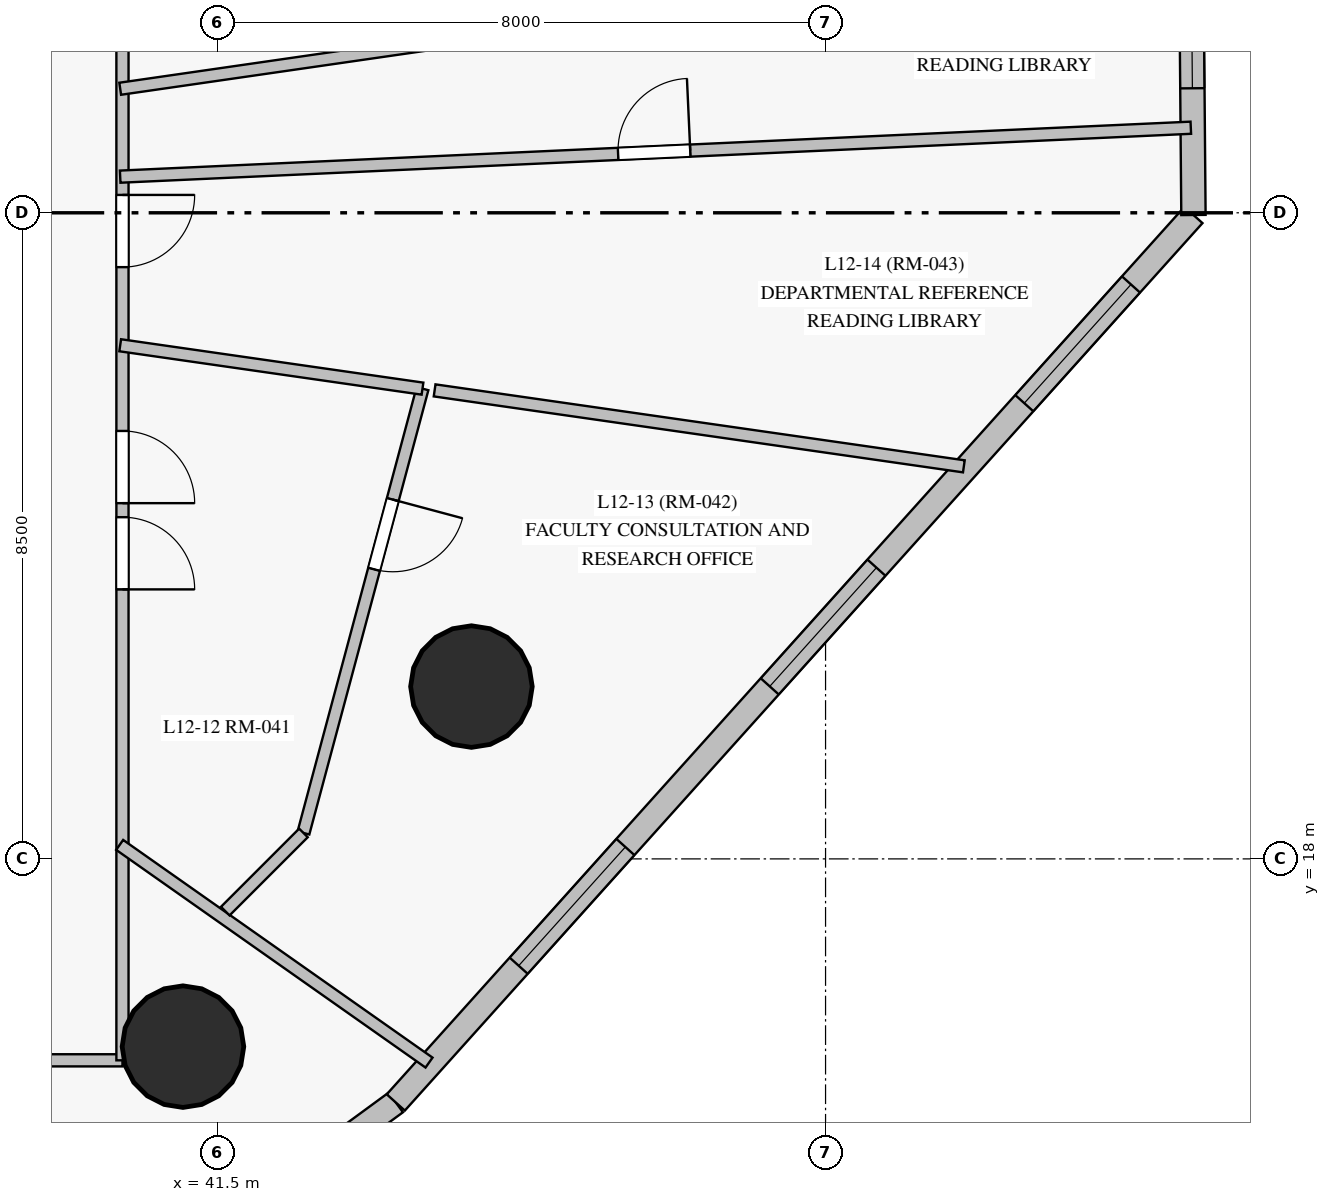
"""IFC4 building model, lengths in metres.
Left out: names, types, materials, properties, quantities, classifications, styles, units other than length and angle.
Written with IfcOpenShell. Run it as: python <this file> out.ifc"""

import sys

from ifc_helpers import new_model, si_unit, direction, frame, frame_2d, origin, origin_with_axes, origin_2d, place, context, subcontext, project, spatial, rectangle, circle, extrude, source, transform, mapped, element, fill, save


model = new_model("IFC4")
c1 = context("Model", 3, precision=1e-05, world=origin(), true_north=direction((0.0, 1.0)))
c2 = subcontext(c1, "Body", "Model", "MODEL_VIEW")
j1 = project(units=[si_unit("LENGTHUNIT", "METRE"), si_unit("PLANEANGLEUNIT", "RADIAN")], contexts=[c1])
p1 = place(None, origin())
s1 = spatial("IfcSite", under=j1, at=p1, CompositionType="ELEMENT")
p2 = place(p1, origin())
s2 = spatial("IfcBuilding", under=s1, at=p2, CompositionType="ELEMENT")
p3 = place(p2, frame((0.0, 0.0, 48.1)))
s3 = spatial("IfcBuildingStorey", under=s2, at=p3, CompositionType="ELEMENT", Elevation=48.1)
m1 = source(origin_with_axes(), c2, "Body", "SweptSolid", [
    extrude(circle(Radius=0.8, at=origin_2d()), origin(), (0.0, 0.0, 1.0), 3.6),
])
for number, where, z_axis, x_axis in (
    (1, (44.841, 20.267, 0.0), (0.0, 0.0, 1.0), (1.0, 0.0, 0.0)),
    (2, (41.046, 15.53, 0.0), (0.0, 0.0, 1.0), (1.0, 0.0, 0.0)),
):
    element("IfcColumn", number, at=place(p3, frame(where, z_axis=z_axis, x_axis=x_axis)), inside=s3, PredefinedType="COLUMN", context=c2, shape_type="MappedRepresentation", body=[
        mapped(m1, transform((0.0, 0.0, 0.0), scale=1.0)),
    ])
p4 = place(p3, frame((35.042, 8.343, 0.0), z_axis=(0.0, 0.0, 1.0), x_axis=(0.806545755589, 0.591171670618, 0.0)))
e3 = element("IfcWall", 3, at=p4, inside=s3, PredefinedType="SOLIDWALL", context=c2, shape_type="SweptSolid", body=[
    extrude(rectangle(XDim=10.916, YDim=0.32, at=frame_2d((5.458, 0.0))), origin(), (0.0, 0.0, 1.0), 3.35),
])
p5 = place(p4, frame((1.869, 0.0, 0.85)))
e4 = element("IfcOpeningElement", 4, at=p5, cuts=e3, PredefinedType="OPENING", context=c2, shape_type="SweptSolid", body=[
    extrude(rectangle(XDim=2.1, YDim=1.95, at=frame_2d((1.05, 0.975))), frame((0.0, 0.17, 0.0), z_axis=(0.0, -1.0, 0.0), x_axis=(1.0, 0.0, 0.0)), (0.0, 0.0, 1.0), 0.34),
])
p6 = place(p4, frame((6.947, 0.0, 0.85)))
e5 = element("IfcOpeningElement", 5, at=p6, cuts=e3, PredefinedType="OPENING", context=c2, shape_type="SweptSolid", body=[
    extrude(rectangle(XDim=2.1, YDim=1.95, at=frame_2d((1.05, 0.975))), frame((0.0, 0.17, 0.0), z_axis=(0.0, -1.0, 0.0), x_axis=(1.0, 0.0, 0.0)), (0.0, 0.0, 1.0), 0.34),
])
p7 = place(p3, frame((43.846, 14.796, 0.0), z_axis=(0.0, 0.0, 1.0), x_axis=(0.668485145509, 0.743725493871, 0.0)))
e6 = element("IfcWall", 6, at=p7, inside=s3, PredefinedType="SOLIDWALL", context=c2, shape_type="SweptSolid", body=[
    extrude(rectangle(XDim=15.698, YDim=0.32, at=frame_2d((7.849, 0.0))), origin(), (0.0, 0.0, 1.0), 3.35),
])
p8 = place(p7, frame((2.419, 0.0, 0.85)))
e7 = element("IfcOpeningElement", 7, at=p8, cuts=e6, PredefinedType="OPENING", context=c2, shape_type="SweptSolid", body=[
    extrude(rectangle(XDim=2.1, YDim=1.95, at=frame_2d((1.05, 0.975))), frame((0.0, 0.17, 0.0), z_axis=(0.0, -1.0, 0.0), x_axis=(1.0, 0.0, 0.0)), (0.0, 0.0, 1.0), 0.34),
])
p9 = place(p7, frame((7.36, 0.0, 0.85)))
e8 = element("IfcOpeningElement", 8, at=p9, cuts=e6, PredefinedType="OPENING", context=c2, shape_type="SweptSolid", body=[
    extrude(rectangle(XDim=2.1, YDim=1.95, at=frame_2d((1.05, 0.975))), frame((0.0, 0.17, 0.0), z_axis=(0.0, -1.0, 0.0), x_axis=(1.0, 0.0, 0.0)), (0.0, 0.0, 1.0), 0.34),
])
p10 = place(p7, frame((12.369, 0.0, 0.85)))
e9 = element("IfcOpeningElement", 9, at=p10, cuts=e6, PredefinedType="OPENING", context=c2, shape_type="SweptSolid", body=[
    extrude(rectangle(XDim=2.1, YDim=1.95, at=frame_2d((1.05, 0.975))), frame((0.0, 0.17, 0.0), z_axis=(0.0, -1.0, 0.0), x_axis=(1.0, 0.0, 0.0)), (0.0, 0.0, 1.0), 0.34),
])
p11 = place(p3, frame((54.34, 26.471, 0.0), z_axis=(0.0, 0.0, 1.0), x_axis=(-0.008424635088, 0.999964512132, 0.0)))
e10 = element("IfcWall", 10, at=p11, inside=s3, PredefinedType="SOLIDWALL", context=c2, shape_type="SweptSolid", body=[
    extrude(rectangle(XDim=10.462, YDim=0.32, at=frame_2d((5.231, 0.0))), origin(), (0.0, 0.0, 1.0), 3.35),
])
p12 = place(p11, frame((1.667, 0.0, 0.85)))
e11 = element("IfcOpeningElement", 11, at=p12, cuts=e10, PredefinedType="OPENING", context=c2, shape_type="SweptSolid", body=[
    extrude(rectangle(XDim=1.5, YDim=1.85, at=frame_2d((0.75, 0.925))), frame((0.0, 0.17, 0.0), z_axis=(0.0, -1.0, 0.0), x_axis=(1.0, 0.0, 0.0)), (0.0, 0.0, 1.0), 0.34),
])
p13 = place(p11, frame((4.245, 0.0, 0.85)))
e12 = element("IfcOpeningElement", 12, at=p13, cuts=e10, PredefinedType="OPENING", context=c2, shape_type="SweptSolid", body=[
    extrude(rectangle(XDim=1.8, YDim=1.85, at=frame_2d((0.9, 0.925))), frame((0.0, 0.17, 0.0), z_axis=(0.0, -1.0, 0.0), x_axis=(1.0, 0.0, 0.0)), (0.0, 0.0, 1.0), 0.34),
])
p14 = place(p11, frame((7.452, 0.0, 0.85)))
e13 = element("IfcOpeningElement", 13, at=p14, cuts=e10, PredefinedType="OPENING", context=c2, shape_type="SweptSolid", body=[
    extrude(rectangle(XDim=2.1, YDim=1.95, at=frame_2d((1.05, 0.975))), frame((0.0, 0.17, 0.0), z_axis=(0.0, -1.0, 0.0), x_axis=(1.0, 0.0, 0.0)), (0.0, 0.0, 1.0), 0.34),
])
p15 = place(p3, frame((40.25, 15.35, 0.0), z_axis=(0.0, 0.0, 1.0), x_axis=(-1.0, 0.0, 0.0)))
e14 = element("IfcWall", 14, at=p15, inside=s3, PredefinedType="PARTITIONING", context=c2, shape_type="SweptSolid", body=[
    extrude(rectangle(XDim=29.75, YDim=0.16, at=frame_2d((14.875, 0.0))), origin(), (0.0, 0.0, 1.0), 2.7),
])
p16 = place(p15, frame((26.423, 0.0, 0.0)))
e15 = element("IfcOpeningElement", 15, at=p16, cuts=e14, PredefinedType="OPENING", context=c2, shape_type="SweptSolid", body=[
    extrude(rectangle(XDim=0.95, YDim=2.15, at=frame_2d((0.475, 1.075))), frame((0.0, 0.09, 0.0), z_axis=(0.0, -1.0, 0.0), x_axis=(1.0, 0.0, 0.0)), (0.0, 0.0, 1.0), 0.18),
])
p17 = place(p15, frame((21.837, 0.0, 0.0)))
e16 = element("IfcOpeningElement", 16, at=p17, cuts=e14, PredefinedType="OPENING", context=c2, shape_type="SweptSolid", body=[
    extrude(rectangle(XDim=0.95, YDim=2.15, at=frame_2d((0.475, 1.075))), frame((0.0, 0.09, 0.0), z_axis=(0.0, -1.0, 0.0), x_axis=(1.0, 0.0, 0.0)), (0.0, 0.0, 1.0), 0.18),
])
p18 = place(p15, frame((18.863, 0.0, 0.0)))
e17 = element("IfcOpeningElement", 17, at=p18, cuts=e14, PredefinedType="OPENING", context=c2, shape_type="SweptSolid", body=[
    extrude(rectangle(XDim=0.95, YDim=2.15, at=frame_2d((0.475, 1.075))), frame((0.0, 0.09, 0.0), z_axis=(0.0, -1.0, 0.0), x_axis=(1.0, 0.0, 0.0)), (0.0, 0.0, 1.0), 0.18),
])
p19 = place(p15, frame((16.388, 0.0, 0.0)))
e18 = element("IfcOpeningElement", 18, at=p19, cuts=e14, PredefinedType="OPENING", context=c2, shape_type="SweptSolid", body=[
    extrude(rectangle(XDim=0.95, YDim=2.15, at=frame_2d((0.475, 1.075))), frame((0.0, 0.09, 0.0), z_axis=(0.0, -1.0, 0.0), x_axis=(1.0, 0.0, 0.0)), (0.0, 0.0, 1.0), 0.18),
])
p20 = place(p15, frame((14.4, 0.0, 0.0)))
e19 = element("IfcOpeningElement", 19, at=p20, cuts=e14, PredefinedType="OPENING", context=c2, shape_type="SweptSolid", body=[
    extrude(rectangle(XDim=0.95, YDim=2.15, at=frame_2d((0.475, 1.075))), frame((0.0, 0.09, 0.0), z_axis=(0.0, -1.0, 0.0), x_axis=(1.0, 0.0, 0.0)), (0.0, 0.0, 1.0), 0.18),
])
p21 = place(p15, frame((12.118, 0.0, 0.0)))
e20 = element("IfcOpeningElement", 20, at=p21, cuts=e14, PredefinedType="OPENING", context=c2, shape_type="SweptSolid", body=[
    extrude(rectangle(XDim=0.95, YDim=2.15, at=frame_2d((0.475, 1.075))), frame((0.0, 0.09, 0.0), z_axis=(0.0, -1.0, 0.0), x_axis=(1.0, 0.0, 0.0)), (0.0, 0.0, 1.0), 0.18),
])
p22 = place(p15, frame((9.938, 0.0, 0.0)))
e21 = element("IfcOpeningElement", 21, at=p22, cuts=e14, PredefinedType="OPENING", context=c2, shape_type="SweptSolid", body=[
    extrude(rectangle(XDim=0.95, YDim=2.15, at=frame_2d((0.475, 1.075))), frame((0.0, 0.09, 0.0), z_axis=(0.0, -1.0, 0.0), x_axis=(1.0, 0.0, 0.0)), (0.0, 0.0, 1.0), 0.18),
])
p23 = place(p15, frame((6.962, 0.0, 0.0)))
e22 = element("IfcOpeningElement", 22, at=p23, cuts=e14, PredefinedType="OPENING", context=c2, shape_type="SweptSolid", body=[
    extrude(rectangle(XDim=0.95, YDim=2.15, at=frame_2d((0.475, 1.075))), frame((0.0, 0.09, 0.0), z_axis=(0.0, -1.0, 0.0), x_axis=(1.0, 0.0, 0.0)), (0.0, 0.0, 1.0), 0.18),
])
p24 = place(p3, frame((40.25, 37.65, 0.0), z_axis=(0.0, 0.0, 1.0), x_axis=(0.0, -1.0, 0.0)))
e23 = element("IfcWall", 23, at=p24, inside=s3, PredefinedType="PARTITIONING", context=c2, shape_type="SweptSolid", body=[
    extrude(rectangle(XDim=22.3, YDim=0.16, at=frame_2d((11.15, 0.0))), origin(), (0.0, 0.0, 1.0), 2.75),
])
p25 = place(p24, frame((14.02, 0.0, 0.0)))
e24 = element("IfcOpeningElement", 24, at=p25, cuts=e23, PredefinedType="OPENING", context=c2, shape_type="SweptSolid", body=[
    extrude(rectangle(XDim=0.95, YDim=2.15, at=frame_2d((0.475, 1.075))), frame((0.0, 0.09, 0.0), z_axis=(0.0, -1.0, 0.0), x_axis=(1.0, 0.0, 0.0)), (0.0, 0.0, 1.0), 0.18),
])
p26 = place(p24, frame((10.915, 0.0, 0.0)))
e25 = element("IfcOpeningElement", 25, at=p26, cuts=e23, PredefinedType="OPENING", context=c2, shape_type="SweptSolid", body=[
    extrude(rectangle(XDim=0.95, YDim=2.15, at=frame_2d((0.475, 1.075))), frame((0.0, 0.09, 0.0), z_axis=(0.0, -1.0, 0.0), x_axis=(1.0, 0.0, 0.0)), (0.0, 0.0, 1.0), 0.18),
])
p27 = place(p24, frame((7.051, 0.0, 0.0)))
e26 = element("IfcOpeningElement", 26, at=p27, cuts=e23, PredefinedType="OPENING", context=c2, shape_type="SweptSolid", body=[
    extrude(rectangle(XDim=0.86, YDim=2.1, at=frame_2d((0.43, 1.05))), frame((0.0, 0.09, 0.0), z_axis=(0.0, -1.0, 0.0), x_axis=(1.0, 0.0, 0.0)), (0.0, 0.0, 1.0), 0.18),
])
p28 = place(p24, frame((3.49, 0.0, 0.0)))
e27 = element("IfcOpeningElement", 27, at=p28, cuts=e23, PredefinedType="OPENING", context=c2, shape_type="SweptSolid", body=[
    extrude(rectangle(XDim=0.95, YDim=2.15, at=frame_2d((0.475, 1.075))), frame((0.0, 0.09, 0.0), z_axis=(0.0, -1.0, 0.0), x_axis=(1.0, 0.0, 0.0)), (0.0, 0.0, 1.0), 0.18),
])
p29 = place(p24, frame((1.36, 0.0, 0.0)))
e28 = element("IfcOpeningElement", 28, at=p29, cuts=e23, PredefinedType="OPENING", context=c2, shape_type="SweptSolid", body=[
    extrude(rectangle(XDim=0.95, YDim=2.15, at=frame_2d((0.475, 1.075))), frame((0.0, 0.09, 0.0), z_axis=(0.0, -1.0, 0.0), x_axis=(1.0, 0.0, 0.0)), (0.0, 0.0, 1.0), 0.18),
])
p30 = place(p24, frame((0.263, 0.0, 0.0)))
e29 = element("IfcOpeningElement", 29, at=p30, cuts=e23, PredefinedType="OPENING", context=c2, shape_type="SweptSolid", body=[
    extrude(rectangle(XDim=0.95, YDim=2.15, at=frame_2d((0.475, 1.075))), frame((0.0, 0.09, 0.0), z_axis=(0.0, -1.0, 0.0), x_axis=(1.0, 0.0, 0.0)), (0.0, 0.0, 1.0), 0.18),
])
p31 = place(p24, frame((15.155, 0.0, 0.0)))
e30 = element("IfcOpeningElement", 30, at=p31, cuts=e23, PredefinedType="OPENING", context=c2, shape_type="SweptSolid", body=[
    extrude(rectangle(XDim=0.95, YDim=2.15, at=frame_2d((0.475, 1.075))), frame((0.0, 0.09, 0.0), z_axis=(0.0, -1.0, 0.0), x_axis=(1.0, 0.0, 0.0)), (0.0, 0.0, 1.0), 0.18),
])
p32 = place(p24, frame((5.17, 0.0, 0.0)))
e31 = element("IfcOpeningElement", 31, at=p32, cuts=e23, PredefinedType="OPENING", context=c2, shape_type="SweptSolid", body=[
    extrude(rectangle(XDim=0.86, YDim=2.04, at=frame_2d((0.43, 1.02))), frame((0.0, 0.09, 0.0), z_axis=(0.0, -1.0, 0.0), x_axis=(1.0, 0.0, 0.0)), (0.0, 0.0, 1.0), 0.18),
])
p33 = place(p3, frame((40.22, 28.132, 0.0), z_axis=(0.0, 0.0, 1.0), x_axis=(0.989733920752, 0.142922237992, 0.0)))
e32 = element("IfcWall", 32, at=p33, inside=s3, PredefinedType="PARTITIONING", context=c2, shape_type="SweptSolid", body=[
    extrude(rectangle(XDim=14.209, YDim=0.16, at=frame_2d((7.104, 0.0))), origin(), (0.0, 0.0, 1.0), 3.35),
])
p34 = place(p3, frame((40.22, 26.976, 0.0), z_axis=(0.0, 0.0, 1.0), x_axis=(0.998957874031, 0.045641712413, 0.0)))
e33 = element("IfcWall", 33, at=p34, inside=s3, PredefinedType="PARTITIONING", context=c2, shape_type="SweptSolid", body=[
    extrude(rectangle(XDim=14.1, YDim=0.16, at=frame_2d((7.05, 0.0))), origin(), (0.0, 0.0, 1.0), 3.35),
])
p35 = place(p34, frame((6.558, 0.0, 0.0)))
e34 = element("IfcOpeningElement", 34, at=p35, cuts=e33, PredefinedType="OPENING", context=c2, shape_type="SweptSolid", body=[
    extrude(rectangle(XDim=0.95, YDim=2.15, at=frame_2d((0.475, 1.075))), frame((0.0, 0.09, 0.0), z_axis=(0.0, -1.0, 0.0), x_axis=(1.0, 0.0, 0.0)), (0.0, 0.0, 1.0), 0.18),
])
p36 = place(p3, frame((44.357, 24.164, 0.0), z_axis=(0.0, 0.0, 1.0), x_axis=(0.989857654875, -0.142062743483, 0.0)))
e35 = element("IfcWall", 35, at=p36, inside=s3, PredefinedType="PARTITIONING", context=c2, shape_type="SweptSolid", body=[
    extrude(rectangle(XDim=7.034, YDim=0.16, at=frame_2d((3.517, 0.0))), origin(), (0.0, 0.0, 1.0), 3.35),
])
p37 = place(p3, frame((44.197, 24.187, 0.0), z_axis=(0.0, 0.0, 1.0), x_axis=(-0.258810027393, -0.965928242532, 0.0)))
e36 = element("IfcWall", 36, at=p37, inside=s3, PredefinedType="PARTITIONING", context=c2, shape_type="SweptSolid", body=[
    extrude(rectangle(XDim=6.052, YDim=0.16, at=frame_2d((3.026, 0.0))), origin(), (0.0, 0.0, 1.0), 2.75),
])
p38 = place(p37, frame((1.511, 0.0, 0.0)))
e37 = element("IfcOpeningElement", 37, at=p38, cuts=e36, PredefinedType="OPENING", context=c2, shape_type="SweptSolid", body=[
    extrude(rectangle(XDim=0.95, YDim=2.15, at=frame_2d((0.475, 1.075))), frame((0.0, 0.09, 0.0), z_axis=(0.0, -1.0, 0.0), x_axis=(1.0, 0.0, 0.0)), (0.0, 0.0, 1.0), 0.18),
])
p39 = place(p3, frame((40.213, 18.184, 0.0), z_axis=(0.0, 0.0, 1.0), x_axis=(0.817839768115, -0.575446012836, 0.0)))
e38 = element("IfcWall", 38, at=p39, inside=s3, PredefinedType="PARTITIONING", context=c2, shape_type="SweptSolid", body=[
    extrude(rectangle(XDim=4.977, YDim=0.16, at=frame_2d((2.488, 0.0))), origin(), (0.0, 0.0, 1.0), 3.35),
])
p40 = place(p3, frame((40.22, 24.757, 0.0), z_axis=(0.0, 0.0, 1.0), x_axis=(0.989856920195, -0.142067862456, 0.0)))
e39 = element("IfcWall", 39, at=p40, inside=s3, PredefinedType="PARTITIONING", context=c2, shape_type="SweptSolid", body=[
    extrude(rectangle(XDim=4.018, YDim=0.16, at=frame_2d((2.009, 0.0))), origin(), (0.0, 0.0, 1.0), 3.35),
])
p41 = place(p3, frame((42.631, 18.341, 0.0), z_axis=(0.0, 0.0, 1.0), x_axis=(-0.707190705793, -0.707022846618, 0.0)))
e40 = element("IfcWall", 40, at=p41, inside=s3, PredefinedType="PARTITIONING", context=c2, shape_type="SweptSolid", body=[
    extrude(rectangle(XDim=1.454, YDim=0.16, at=frame_2d((0.727, 0.0))), origin(), (0.0, 0.0, 1.0), 2.75),
])
m2 = source(origin_with_axes(), c2, "Body", "SweptSolid", [
    extrude(rectangle(XDim=2.1, YDim=1.95, at=frame_2d((1.05, 0.975))), frame((0.0, 0.03, 0.0), z_axis=(0.0, -1.0, 0.0), x_axis=(1.0, 0.0, 0.0)), (0.0, 0.0, 1.0), 0.06),
])
p42 = place(p8, origin())
e41 = element("IfcWindow", 41, at=p42, inside=s3, PartitioningType="SINGLE_PANEL", PredefinedType="WINDOW", context=c2, shape_type="MappedRepresentation", body=[
    mapped(m2, transform((0.0, 0.0, 0.0), scale=1.0)),
])
fill(e7, e41)
p43 = place(p9, origin())
e42 = element("IfcWindow", 42, at=p43, inside=s3, PartitioningType="SINGLE_PANEL", PredefinedType="WINDOW", context=c2, shape_type="MappedRepresentation", body=[
    mapped(m2, transform((0.0, 0.0, 0.0), scale=1.0)),
])
fill(e8, e42)
p44 = place(p10, origin())
e43 = element("IfcWindow", 43, at=p44, inside=s3, PartitioningType="SINGLE_PANEL", PredefinedType="WINDOW", context=c2, shape_type="MappedRepresentation", body=[
    mapped(m2, transform((0.0, 0.0, 0.0), scale=1.0)),
])
fill(e9, e43)
m3 = source(origin_with_axes(), c2, "Body", "SweptSolid", [
    extrude(rectangle(XDim=1.5, YDim=1.85, at=frame_2d((0.75, 0.925))), frame((0.0, 0.03, 0.0), z_axis=(0.0, -1.0, 0.0), x_axis=(1.0, 0.0, 0.0)), (0.0, 0.0, 1.0), 0.06),
])
p45 = place(p12, origin())
e44 = element("IfcWindow", 44, at=p45, inside=s3, PartitioningType="SINGLE_PANEL", PredefinedType="WINDOW", context=c2, shape_type="MappedRepresentation", body=[
    mapped(m3, transform((0.0, 0.0, 0.0), scale=1.0)),
])
fill(e11, e44)
m4 = source(origin_with_axes(), c2, "Body", "SweptSolid", [
    extrude(rectangle(XDim=0.95, YDim=2.15, at=frame_2d((0.475, 1.075))), frame((0.0, 0.025, 0.0), z_axis=(0.0, -1.0, 0.0), x_axis=(1.0, 0.0, 0.0)), (0.0, 0.0, 1.0), 0.05),
])
p46 = place(p25, origin())
e45 = element("IfcDoor", 45, at=p46, inside=s3, OperationType="SINGLE_SWING_RIGHT", PredefinedType="DOOR", context=c2, shape_type="MappedRepresentation", body=[
    mapped(m4, transform((0.0, 0.0, 0.0), scale=1.0)),
])
fill(e24, e45)
p47 = place(p26, origin())
e46 = element("IfcDoor", 46, at=p47, inside=s3, OperationType="SINGLE_SWING_LEFT", PredefinedType="DOOR", context=c2, shape_type="MappedRepresentation", body=[
    mapped(m4, transform((0.0, 0.0, 0.0), scale=1.0)),
])
fill(e25, e46)
p48 = place(p31, origin())
e47 = element("IfcDoor", 47, at=p48, inside=s3, OperationType="SINGLE_SWING_RIGHT", PredefinedType="DOOR", context=c2, shape_type="MappedRepresentation", body=[
    mapped(m4, transform((0.0, 0.0, 0.0), scale=1.0)),
])
fill(e30, e47)
p49 = place(p38, origin())
e48 = element("IfcDoor", 48, at=p49, inside=s3, OperationType="SINGLE_SWING_LEFT", PredefinedType="DOOR", context=c2, shape_type="MappedRepresentation", body=[
    mapped(m4, transform((0.0, 0.0, 0.0), scale=1.0)),
])
fill(e37, e48)
p50 = place(p35, origin())
e49 = element("IfcDoor", 49, at=p50, inside=s3, OperationType="SINGLE_SWING_RIGHT", PredefinedType="DOOR", context=c2, shape_type="MappedRepresentation", body=[
    mapped(m4, transform((0.0, 0.0, 0.0), scale=1.0)),
])
fill(e34, e49)
save(model, sys.argv[1])
